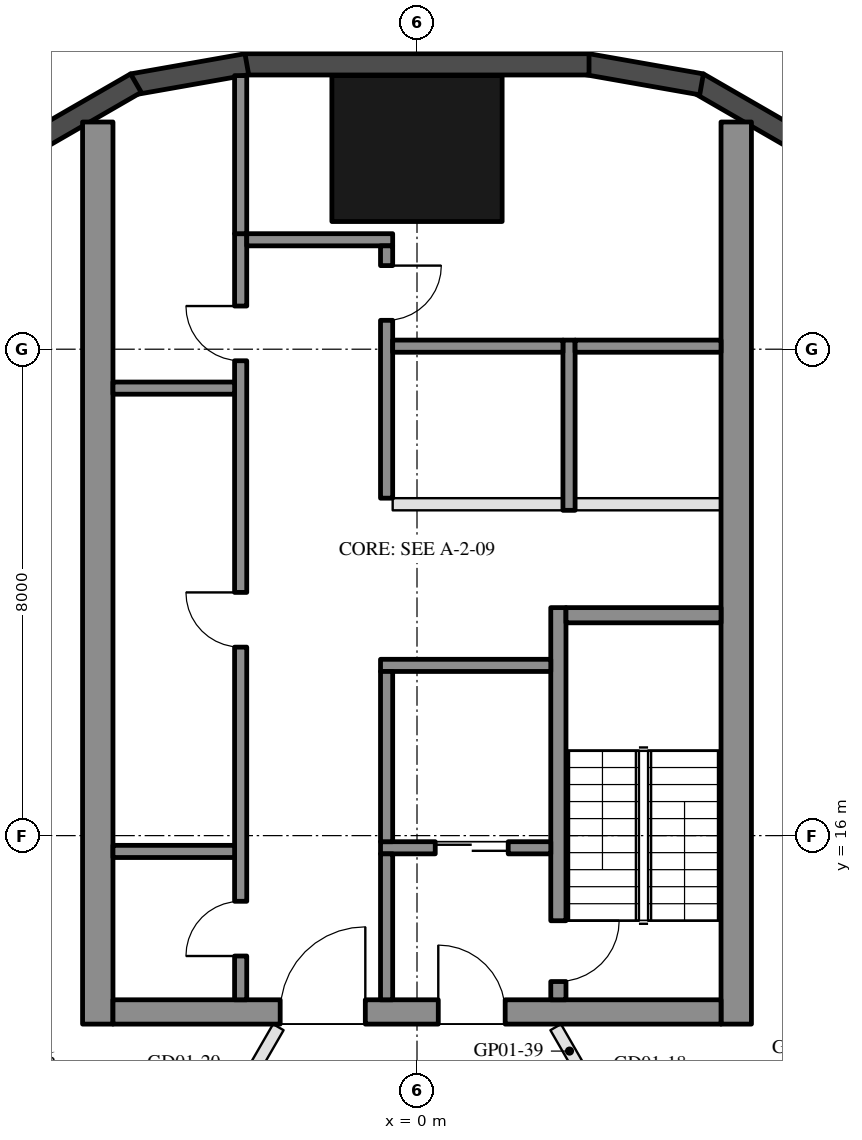
"""IFC4 building model, lengths in metres.
Left out: names, types, materials, properties, quantities, classifications, styles, units other than length and angle.
Written with IfcOpenShell. Run it as: python <this file> out.ifc"""

import sys

from ifc_helpers import new_model, si_unit, direction, frame, frame_2d, origin, origin_2d, place, context, subcontext, project, spatial, rectangle, hollow_rectangle, extrude, element, fill, save


model = new_model("IFC4")
c1 = context("Model", 3, precision=1e-05, world=origin(), true_north=direction((0.0, 1.0)))
c2 = subcontext(c1, "Body", "Model", "MODEL_VIEW")
j1 = project(units=[si_unit("LENGTHUNIT", "METRE"), si_unit("PLANEANGLEUNIT", "RADIAN")], contexts=[c1])
p1 = place(None, origin())
s1 = spatial("IfcSite", under=j1, at=p1, CompositionType="ELEMENT")
p2 = place(p1, origin())
s2 = spatial("IfcBuilding", under=s1, at=p2, CompositionType="ELEMENT")
p3 = place(p2, frame((0.0, 0.0, 46.5)))
s3 = spatial("IfcBuildingStorey", under=s2, at=p3, CompositionType="ELEMENT", Elevation=46.5)
p4 = place(p3, frame((0.0, 27.3, 0.0), z_axis=(0.0, 0.0, 1.0), x_axis=(1.0, 0.0, 0.0)))
e1 = element("IfcColumn", 1, at=p4, inside=s3, PredefinedType="COLUMN", context=c2, shape_type="SweptSolid", body=[
    extrude(hollow_rectangle(XDim=2.8, YDim=2.4, WallThickness=0.07, at=origin_2d()), origin(), (0.0, 0.0, 1.0), 3.7),
])
for number, where, z_axis, x_axis in (
    (2, (6.277, 27.422, 0.0), (0.0, 0.0, 1.0), (-0.866, 0.5, 0.0)),
    (3, (4.68, 28.356, 0.0), (0.0, 0.0, 1.0), (-0.985, 0.174, 0.0)),
):
    element("IfcWall", number, at=place(p3, frame(where, z_axis=z_axis, x_axis=x_axis)), inside=s3, PredefinedType="SOLIDWALL", context=c2, shape_type="SweptSolid", body=[
        extrude(rectangle(XDim=1.91, YDim=0.35, at=frame_2d((0.955, 0.0))), origin(), (0.0, 0.0, 1.0), 3.55),
    ])
p5 = place(p3, frame((2.829, 28.685, 0.0), z_axis=(0.0, 0.0, 1.0), x_axis=(-1.0, 0.0, 0.0)))
e4 = element("IfcWall", 4, at=p5, inside=s3, PredefinedType="SOLIDWALL", context=c2, shape_type="SweptSolid", body=[
    extrude(rectangle(XDim=5.658, YDim=0.35, at=frame_2d((2.829, 0.0))), origin(), (0.0, 0.0, 1.0), 3.55),
])
for number, where, z_axis, x_axis in (
    (5, (-2.799, 28.688, 0.0), (0.0, 0.0, 1.0), (-0.985, -0.174, 0.0)),
    (6, (-4.623, 28.377, 0.0), (0.0, 0.0, 1.0), (-0.866, -0.5, 0.0)),
):
    element("IfcWall", number, at=place(p3, frame(where, z_axis=z_axis, x_axis=x_axis)), inside=s3, PredefinedType="SOLIDWALL", context=c2, shape_type="SweptSolid", body=[
        extrude(rectangle(XDim=1.91, YDim=0.35, at=frame_2d((0.955, 0.0))), origin(), (0.0, 0.0, 1.0), 3.55),
    ])
for number, where, z_axis, x_axis in (
    (7, (5.25, 12.9, 0.0), (0.0, 0.0, 1.0), (0.0, 1.0, 0.0)),
    (8, (-5.25, 12.9, 0.0), (0.0, 0.0, 1.0), (0.0, 1.0, 0.0)),
):
    element("IfcWall", number, at=place(p3, frame(where, z_axis=z_axis, x_axis=x_axis)), inside=s3, PredefinedType="SHEAR", context=c2, shape_type="SweptSolid", body=[
        extrude(rectangle(XDim=14.837, YDim=0.5, at=frame_2d((7.418, 0.0))), origin(), (0.0, 0.0, 1.0), 3.5),
    ])
p6 = place(p3, frame((5.0, 13.1, 0.0), z_axis=(0.0, 0.0, 1.0), x_axis=(-1.0, 0.0, 0.0)))
e9 = element("IfcWall", 9, at=p6, inside=s3, PredefinedType="SHEAR", context=c2, shape_type="SweptSolid", body=[
    extrude(rectangle(XDim=10.0, YDim=0.4, at=frame_2d((5.0, 0.0))), origin(), (0.0, 0.0, 1.0), 3.5),
])
p7 = place(p6, frame((3.55, 0.0, 0.0)))
e10 = element("IfcOpeningElement", 10, at=p7, cuts=e9, PredefinedType="OPENING", context=c2, shape_type="SweptSolid", body=[
    extrude(rectangle(XDim=1.1, YDim=2.1, at=frame_2d((0.55, 1.05))), frame((0.0, 0.21, 0.0), z_axis=(0.0, -1.0, 0.0), x_axis=(1.0, 0.0, 0.0)), (0.0, 0.0, 1.0), 0.42),
])
p8 = place(p6, frame((5.85, 0.0, 0.0)))
e11 = element("IfcOpeningElement", 11, at=p8, cuts=e9, PredefinedType="OPENING", context=c2, shape_type="SweptSolid", body=[
    extrude(rectangle(XDim=1.4, YDim=2.1, at=frame_2d((0.7, 1.05))), frame((0.0, 0.21, 0.0), z_axis=(0.0, -1.0, 0.0), x_axis=(1.0, 0.0, 0.0)), (0.0, 0.0, 1.0), 0.42),
])
p9 = place(p3, frame((2.325, 13.3, 0.0), z_axis=(0.0, 0.0, 1.0), x_axis=(0.0, 1.0, 0.0)))
e12 = element("IfcWall", 12, at=p9, inside=s3, PredefinedType="SHEAR", context=c2, shape_type="SweptSolid", body=[
    extrude(rectangle(XDim=6.45, YDim=0.25, at=frame_2d((3.225, 0.0))), origin(), (0.0, 0.0, 1.0), 3.5),
])
p10 = place(p9, frame((0.3, 0.0, 0.0)))
e13 = element("IfcOpeningElement", 13, at=p10, cuts=e12, PredefinedType="OPENING", context=c2, shape_type="SweptSolid", body=[
    extrude(rectangle(XDim=1.0, YDim=2.1, at=frame_2d((0.5, 1.05))), frame((0.0, 0.135, 0.0), z_axis=(0.0, -1.0, 0.0), x_axis=(1.0, 0.0, 0.0)), (0.0, 0.0, 1.0), 0.27),
])
p11 = place(p3, frame((5.0, 19.625, 0.0), z_axis=(0.0, 0.0, 1.0), x_axis=(-1.0, 0.0, 0.0)))
e14 = element("IfcWall", 14, at=p11, inside=s3, PredefinedType="SHEAR", context=c2, shape_type="SweptSolid", body=[
    extrude(rectangle(XDim=2.55, YDim=0.25, at=frame_2d((1.275, 0.0))), origin(), (0.0, 0.0, 1.0), 3.5),
])
p12 = place(p3, frame((2.2, 18.8, 0.0), z_axis=(0.0, 0.0, 1.0), x_axis=(-1.0, 0.0, 0.0)))
e15 = element("IfcWall", 15, at=p12, inside=s3, PredefinedType="SHEAR", context=c2, shape_type="SweptSolid", body=[
    extrude(rectangle(XDim=2.8, YDim=0.2, at=frame_2d((1.4, 0.0))), origin(), (0.0, 0.0, 1.0), 3.5),
])
p13 = place(p3, frame((2.2, 15.8, 0.0), z_axis=(0.0, 0.0, 1.0), x_axis=(-1.0, 0.0, 0.0)))
e16 = element("IfcWall", 16, at=p13, inside=s3, PredefinedType="SHEAR", context=c2, shape_type="SweptSolid", body=[
    extrude(rectangle(XDim=2.8, YDim=0.2, at=frame_2d((1.4, 0.0))), origin(), (0.0, 0.0, 1.0), 3.5),
])
p14 = place(p13, frame((0.7, 0.0, 0.0)))
e17 = element("IfcOpeningElement", 17, at=p14, cuts=e16, PredefinedType="OPENING", context=c2, shape_type="SweptSolid", body=[
    extrude(rectangle(XDim=1.2, YDim=2.1, at=frame_2d((0.6, 1.05))), frame((0.0, 0.11, 0.0), z_axis=(0.0, -1.0, 0.0), x_axis=(1.0, 0.0, 0.0)), (0.0, 0.0, 1.0), 0.22),
])
p15 = place(p3, frame((-0.5, 15.9, 0.0), z_axis=(0.0, 0.0, 1.0), x_axis=(0.0, 1.0, 0.0)))
e18 = element("IfcWall", 18, at=p15, inside=s3, PredefinedType="SHEAR", context=c2, shape_type="SweptSolid", body=[
    extrude(rectangle(XDim=2.8, YDim=0.2, at=frame_2d((1.4, 0.0))), origin(), (0.0, 0.0, 1.0), 3.5),
])
p16 = place(p3, frame((-0.5, 13.3, 0.0), z_axis=(0.0, 0.0, 1.0), x_axis=(0.0, 1.0, 0.0)))
e19 = element("IfcWall", 19, at=p16, inside=s3, PredefinedType="SHEAR", context=c2, shape_type="SweptSolid", body=[
    extrude(rectangle(XDim=2.4, YDim=0.2, at=frame_2d((1.2, 0.0))), origin(), (0.0, 0.0, 1.0), 3.5),
])
p17 = place(p3, frame((-2.9, 13.3, 0.0), z_axis=(0.0, 0.0, 1.0), x_axis=(0.0, 1.0, 0.0)))
e20 = element("IfcWall", 20, at=p17, inside=s3, PredefinedType="SHEAR", context=c2, shape_type="SweptSolid", body=[
    extrude(rectangle(XDim=12.6, YDim=0.2, at=frame_2d((6.3, 0.0))), origin(), (0.0, 0.0, 1.0), 3.5),
])
p18 = place(p17, frame((0.72, 0.0, 0.0)))
e21 = element("IfcOpeningElement", 21, at=p18, cuts=e20, PredefinedType="OPENING", context=c2, shape_type="SweptSolid", body=[
    extrude(rectangle(XDim=0.9, YDim=2.1, at=frame_2d((0.45, 1.05))), frame((0.0, 0.11, 0.0), z_axis=(0.0, -1.0, 0.0), x_axis=(1.0, 0.0, 0.0)), (0.0, 0.0, 1.0), 0.22),
])
p19 = place(p17, frame((5.8, 0.0, 0.0)))
e22 = element("IfcOpeningElement", 22, at=p19, cuts=e20, PredefinedType="OPENING", context=c2, shape_type="SweptSolid", body=[
    extrude(rectangle(XDim=0.9, YDim=2.1, at=frame_2d((0.45, 1.05))), frame((0.0, 0.11, 0.0), z_axis=(0.0, -1.0, 0.0), x_axis=(1.0, 0.0, 0.0)), (0.0, 0.0, 1.0), 0.22),
])
p20 = place(p17, frame((10.51, 0.0, 0.0)))
e23 = element("IfcOpeningElement", 23, at=p20, cuts=e20, PredefinedType="OPENING", context=c2, shape_type="SweptSolid", body=[
    extrude(rectangle(XDim=0.9, YDim=2.1, at=frame_2d((0.45, 1.05))), frame((0.0, 0.11, 0.0), z_axis=(0.0, -1.0, 0.0), x_axis=(1.0, 0.0, 0.0)), (0.0, 0.0, 1.0), 0.22),
])
p21 = place(p3, frame((-0.4, 25.8, 0.0), z_axis=(0.0, 0.0, 1.0), x_axis=(-1.0, 0.0, 0.0)))
e24 = element("IfcWall", 24, at=p21, inside=s3, PredefinedType="SHEAR", context=c2, shape_type="SweptSolid", body=[
    extrude(rectangle(XDim=2.4, YDim=0.2, at=frame_2d((1.2, 0.0))), origin(), (0.0, 0.0, 1.0), 3.5),
])
p22 = place(p3, frame((-0.5, 21.55, 0.0), z_axis=(0.0, 0.0, 1.0), x_axis=(0.0, 1.0, 0.0)))
e25 = element("IfcWall", 25, at=p22, inside=s3, PredefinedType="SHEAR", context=c2, shape_type="SweptSolid", body=[
    extrude(rectangle(XDim=4.15, YDim=0.2, at=frame_2d((2.075, 0.0))), origin(), (0.0, 0.0, 1.0), 3.5),
])
p23 = place(p22, frame((2.925, 0.0, 0.0)))
e26 = element("IfcOpeningElement", 26, at=p23, cuts=e25, PredefinedType="OPENING", context=c2, shape_type="SweptSolid", body=[
    extrude(rectangle(XDim=0.9, YDim=2.1, at=frame_2d((0.45, 1.05))), frame((0.0, 0.11, 0.0), z_axis=(0.0, -1.0, 0.0), x_axis=(1.0, 0.0, 0.0)), (0.0, 0.0, 1.0), 0.22),
])
for number, where, z_axis, x_axis in (
    (27, (-3.0, 15.74, 0.0), (0.0, 0.0, 1.0), (-1.0, 0.0, 0.0)),
    (28, (-3.0, 23.36, 0.0), (0.0, 0.0, 1.0), (-1.0, 0.0, 0.0)),
):
    element("IfcWall", number, at=place(p3, frame(where, z_axis=z_axis, x_axis=x_axis)), inside=s3, PredefinedType="SHEAR", context=c2, shape_type="SweptSolid", body=[
        extrude(rectangle(XDim=2.0, YDim=0.2, at=frame_2d((1.0, 0.0))), origin(), (0.0, 0.0, 1.0), 3.5),
    ])
p24 = place(p3, frame((-2.9, 25.9, 0.0), z_axis=(0.0, 0.0, 1.0), x_axis=(0.0, 1.0, 0.0)))
e29 = element("IfcWall", 29, at=p24, inside=s3, PredefinedType="SHEAR", context=c2, shape_type="SweptSolid", body=[
    extrude(rectangle(XDim=2.6, YDim=0.2, at=frame_2d((1.3, 0.0))), origin(), (0.0, 0.0, 1.0), 3.5),
])
p25 = place(p3, frame((2.5, 21.35, 0.0), z_axis=(0.0, 0.0, 1.0), x_axis=(0.0, 1.0, 0.0)))
e30 = element("IfcWall", 30, at=p25, inside=s3, PredefinedType="SHEAR", context=c2, shape_type="SweptSolid", body=[
    extrude(rectangle(XDim=2.8, YDim=0.2, at=frame_2d((1.4, 0.0))), origin(), (0.0, 0.0, 1.0), 3.5),
])
p26 = place(p3, frame((5.0, 24.05, 0.0), z_axis=(0.0, 0.0, 1.0), x_axis=(-1.0, 0.0, 0.0)))
e31 = element("IfcWall", 31, at=p26, inside=s3, PredefinedType="SHEAR", context=c2, shape_type="SweptSolid", body=[
    extrude(rectangle(XDim=2.4, YDim=0.2, at=frame_2d((1.2, 0.0))), origin(), (0.0, 0.0, 1.0), 3.5),
])
p27 = place(p3, frame((2.4, 24.05, 0.0), z_axis=(0.0, 0.0, 1.0), x_axis=(-1.0, 0.0, 0.0)))
e32 = element("IfcWall", 32, at=p27, inside=s3, PredefinedType="SHEAR", context=c2, shape_type="SweptSolid", body=[
    extrude(rectangle(XDim=2.8, YDim=0.2, at=frame_2d((1.4, 0.0))), origin(), (0.0, 0.0, 1.0), 3.5),
])
p28 = place(p3, frame((5.0, 21.45, 0.0), z_axis=(0.0, 0.0, 1.0), x_axis=(-1.0, 0.0, 0.0)))
e33 = element("IfcWall", 33, at=p28, inside=s3, PredefinedType="PARTITIONING", context=c2, shape_type="SweptSolid", body=[
    extrude(rectangle(XDim=2.4, YDim=0.2, at=frame_2d((1.2, 0.0))), origin(), (0.0, 0.0, 1.0), 3.5),
])
p29 = place(p3, frame((2.4, 21.45, 0.0), z_axis=(0.0, 0.0, 1.0), x_axis=(-1.0, 0.0, 0.0)))
e34 = element("IfcWall", 34, at=p29, inside=s3, PredefinedType="PARTITIONING", context=c2, shape_type="SweptSolid", body=[
    extrude(rectangle(XDim=2.8, YDim=0.2, at=frame_2d((1.4, 0.0))), origin(), (0.0, 0.0, 1.0), 3.5),
])
p30 = place(p3, frame((13.647, 14.923, 0.0), z_axis=(0.0, 0.0, 1.0), x_axis=(-0.866027479907, -0.499996404033, 0.0)))
e35 = element("IfcWall", 35, at=p30, inside=s3, PredefinedType="PARTITIONING", context=c2, shape_type="SweptSolid", body=[
    extrude(rectangle(XDim=10.98, YDim=0.2, at=frame_2d((5.49, 0.0))), origin(), (0.0, 0.0, 1.0), 2.96),
])
p31 = place(p3, frame((-13.147, 13.989, 0.0), z_axis=(0.0, 0.0, 1.0), x_axis=(0.892898572595, -0.450257858408, 0.0)))
e36 = element("IfcWall", 36, at=p31, inside=s3, PredefinedType="PARTITIONING", context=c2, shape_type="SweptSolid", body=[
    extrude(rectangle(XDim=10.096, YDim=0.2, at=frame_2d((5.048, 0.0))), origin(), (0.0, 0.0, 1.0), 2.96),
])
p32 = place(p3, frame((2.281, 12.85, 0.0), z_axis=(0.0, 0.0, 1.0), x_axis=(0.499979074716, -0.866037484666, 0.0)))
e37 = element("IfcWall", 37, at=p32, inside=s3, PredefinedType="PARTITIONING", context=c2, shape_type="SweptSolid", body=[
    extrude(rectangle(XDim=3.788, YDim=0.2, at=frame_2d((1.894, 0.0))), origin(), (0.0, 0.0, 1.0), 2.95),
])
p33 = place(p32, frame((1.394, 0.0, 0.0)))
e38 = element("IfcOpeningElement", 38, at=p33, cuts=e37, PredefinedType="OPENING", context=c2, shape_type="SweptSolid", body=[
    extrude(rectangle(XDim=1.0, YDim=2.1, at=frame_2d((0.5, 1.05))), frame((0.0, 0.11, 0.0), z_axis=(0.0, -1.0, 0.0), x_axis=(1.0, 0.0, 0.0)), (0.0, 0.0, 1.0), 0.22),
])
p34 = place(p3, frame((-4.172, 9.574, 0.0), z_axis=(0.0, 0.0, 1.0), x_axis=(0.499985062256, 0.866034027923, 0.0)))
e39 = element("IfcWall", 39, at=p34, inside=s3, PredefinedType="PARTITIONING", context=c2, shape_type="SweptSolid", body=[
    extrude(rectangle(XDim=3.782, YDim=0.2, at=frame_2d((1.891, 0.0))), origin(), (0.0, 0.0, 1.0), 2.95),
])
p35 = place(p34, frame((1.391, 0.0, 0.0)))
e40 = element("IfcOpeningElement", 40, at=p35, cuts=e39, PredefinedType="OPENING", context=c2, shape_type="SweptSolid", body=[
    extrude(rectangle(XDim=1.0, YDim=2.1, at=frame_2d((0.5, 1.05))), frame((0.0, 0.11, 0.0), z_axis=(0.0, -1.0, 0.0), x_axis=(1.0, 0.0, 0.0)), (0.0, 0.0, 1.0), 0.22),
])
p36 = place(p14, origin())
e41 = element("IfcDoor", 41, at=p36, inside=s3, OperationType="DOUBLE_DOOR_SLIDING", PredefinedType="DOOR", context=c2, shape_type="SweptSolid", body=[
    extrude(rectangle(XDim=1.2, YDim=2.1, at=frame_2d((0.6, 1.05))), frame((0.0, 0.025, 0.0), z_axis=(0.0, -1.0, 0.0), x_axis=(1.0, 0.0, 0.0)), (0.0, 0.0, 1.0), 0.05),
])
fill(e17, e41)
p37 = place(p18, origin())
e42 = element("IfcDoor", 42, at=p37, inside=s3, OperationType="SINGLE_SWING_LEFT", PredefinedType="DOOR", context=c2, shape_type="SweptSolid", body=[
    extrude(rectangle(XDim=0.9, YDim=2.1, at=frame_2d((0.45, 1.05))), frame((0.0, 0.025, 0.0), z_axis=(0.0, -1.0, 0.0), x_axis=(1.0, 0.0, 0.0)), (0.0, 0.0, 1.0), 0.05),
])
fill(e21, e42)
p38 = place(p19, origin())
e43 = element("IfcDoor", 43, at=p38, inside=s3, OperationType="SINGLE_SWING_RIGHT", PredefinedType="DOOR", context=c2, shape_type="SweptSolid", body=[
    extrude(rectangle(XDim=0.9, YDim=2.1, at=frame_2d((0.45, 1.05))), frame((0.0, 0.025, 0.0), z_axis=(0.0, -1.0, 0.0), x_axis=(1.0, 0.0, 0.0)), (0.0, 0.0, 1.0), 0.05),
])
fill(e22, e43)
p39 = place(p20, origin())
e44 = element("IfcDoor", 44, at=p39, inside=s3, OperationType="SINGLE_SWING_RIGHT", PredefinedType="DOOR", context=c2, shape_type="SweptSolid", body=[
    extrude(rectangle(XDim=0.9, YDim=2.1, at=frame_2d((0.45, 1.05))), frame((0.0, 0.025, 0.0), z_axis=(0.0, -1.0, 0.0), x_axis=(1.0, 0.0, 0.0)), (0.0, 0.0, 1.0), 0.05),
])
fill(e23, e44)
p40 = place(p23, frame((0.9, 0.0, 0.0), z_axis=(0.0, 0.0, 1.0), x_axis=(-1.0, 0.0, 0.0)))
e45 = element("IfcDoor", 45, at=p40, inside=s3, OperationType="SINGLE_SWING_LEFT", PredefinedType="DOOR", context=c2, shape_type="SweptSolid", body=[
    extrude(rectangle(XDim=0.9, YDim=2.1, at=frame_2d((0.45, 1.05))), frame((0.0, 0.025, 0.0), z_axis=(0.0, -1.0, 0.0), x_axis=(1.0, 0.0, 0.0)), (0.0, 0.0, 1.0), 0.05),
])
fill(e26, e45)
p41 = place(p7, frame((1.1, 0.0, 0.0), z_axis=(0.0, 0.0, 1.0), x_axis=(-1.0, 0.0, 0.0)))
e46 = element("IfcDoor", 46, at=p41, inside=s3, OperationType="SINGLE_SWING_LEFT", PredefinedType="DOOR", context=c2, shape_type="SweptSolid", body=[
    extrude(rectangle(XDim=1.1, YDim=2.1, at=frame_2d((0.55, 1.05))), frame((0.0, 0.025, 0.0), z_axis=(0.0, -1.0, 0.0), x_axis=(1.0, 0.0, 0.0)), (0.0, 0.0, 1.0), 0.05),
])
fill(e10, e46)
p42 = place(p8, frame((1.4, 0.0, 0.0), z_axis=(0.0, 0.0, 1.0), x_axis=(-1.0, 0.0, 0.0)))
e47 = element("IfcDoor", 47, at=p42, inside=s3, OperationType="DOUBLE_DOOR_SINGLE_SWING", PredefinedType="DOOR", context=c2, shape_type="SweptSolid", body=[
    extrude(rectangle(XDim=1.4, YDim=2.1, at=frame_2d((0.7, 1.05))), frame((0.0, 0.025, 0.0), z_axis=(0.0, -1.0, 0.0), x_axis=(1.0, 0.0, 0.0)), (0.0, 0.0, 1.0), 0.05),
])
fill(e11, e47)
p43 = place(p10, frame((1.0, 0.0, 0.0), z_axis=(0.0, 0.0, 1.0), x_axis=(-1.0, 0.0, 0.0)))
e48 = element("IfcDoor", 48, at=p43, inside=s3, OperationType="SINGLE_SWING_LEFT", PredefinedType="DOOR", context=c2, shape_type="SweptSolid", body=[
    extrude(rectangle(XDim=1.0, YDim=2.1, at=frame_2d((0.5, 1.05))), frame((0.0, 0.025, 0.0), z_axis=(0.0, -1.0, 0.0), x_axis=(1.0, 0.0, 0.0)), (0.0, 0.0, 1.0), 0.05),
])
fill(e13, e48)
save(model, sys.argv[1])
